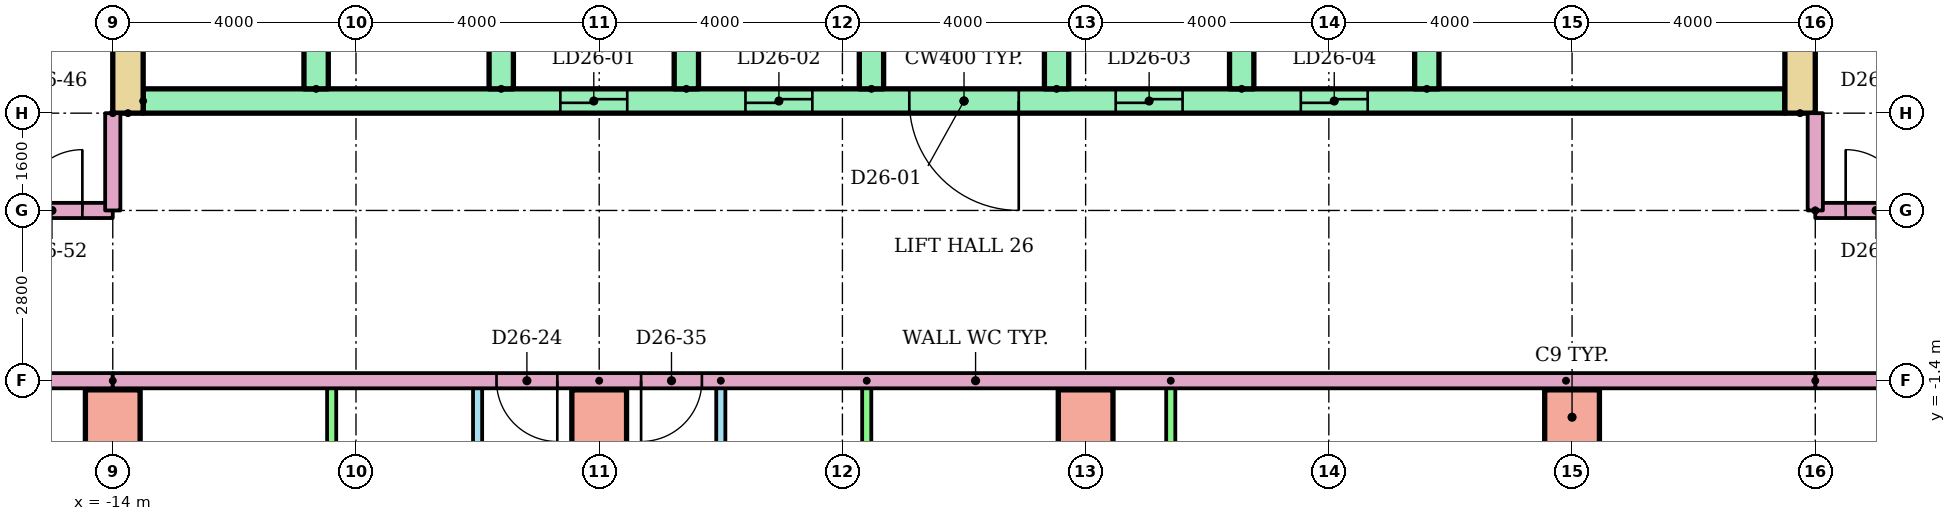
"""IFC4 building model, lengths in metres.
Left out: names, types, materials, properties, quantities, classifications, styles, units other than length and angle.
Written with IfcOpenShell. Run it as: python <this file> out.ifc"""

import sys

from ifc_helpers import new_model, si_unit, direction, frame, frame_2d, origin, origin_2d, place, context, subcontext, project, spatial, rectangle, extrude, element, fill, save


model = new_model("IFC4")
c1 = context("Model", 3, precision=1e-05, world=origin(), true_north=direction((0.0, 1.0)))
c2 = subcontext(c1, "Body", "Model", "MODEL_VIEW")
j1 = project(units=[si_unit("LENGTHUNIT", "METRE"), si_unit("PLANEANGLEUNIT", "RADIAN")], contexts=[c1])
p1 = place(None, origin())
s1 = spatial("IfcSite", under=j1, at=p1, CompositionType="ELEMENT")
p2 = place(p1, origin())
s2 = spatial("IfcBuilding", under=s1, at=p2, CompositionType="ELEMENT")
p3 = place(p2, frame((0.0, 0.0, 99.9)))
s3 = spatial("IfcBuildingStorey", under=s2, at=p3, CompositionType="ELEMENT", Elevation=99.9)
for number, where in (
    (1, (-14.0, -2.0, 0.0)),
    (2, (-6.0, -2.0, 0.0)),
    (3, (2.0, -2.0, 0.0)),
    (4, (10.0, -2.0, 0.0)),
):
    element("IfcColumn", number, at=place(p3, frame(where)), inside=s3, PredefinedType="COLUMN", context=c2, shape_type="SweptSolid", body=[
        extrude(rectangle(XDim=0.9, YDim=0.9, at=origin_2d()), origin(), (0.0, 0.0, 1.0), 3.2),
    ])
for number, where, z_axis, x_axis in (
    (5, (-13.75, 3.0, 0.0), (0.0, 0.0, 1.0), (0.0, 1.0, 0.0)),
    (6, (13.75, 3.0, 0.0), (0.0, 0.0, 1.0), (0.0, 1.0, 0.0)),
):
    element("IfcWall", number, at=place(p3, frame(where, z_axis=z_axis, x_axis=x_axis)), inside=s3, PredefinedType="SHEAR", context=c2, shape_type="SweptSolid", body=[
        extrude(rectangle(XDim=17.0, YDim=0.5, at=frame_2d((8.5, 0.0))), origin(), (0.0, 0.0, 1.0), 2.92),
    ])
p4 = place(p3, frame((-13.5, 3.2, 0.0)))
e7 = element("IfcWall", 7, at=p4, inside=s3, PredefinedType="SHEAR", context=c2, shape_type="SweptSolid", body=[
    extrude(rectangle(XDim=27.0, YDim=0.4, at=frame_2d((13.5, 0.0))), origin(), (0.0, 0.0, 1.0), 2.92),
])
p5 = place(p4, frame((6.861, 0.0, 0.0)))
e8 = element("IfcOpeningElement", 8, at=p5, cuts=e7, PredefinedType="OPENING", context=c2, shape_type="SweptSolid", body=[
    extrude(rectangle(XDim=1.1, YDim=2.1, at=frame_2d((0.55, 1.05))), frame((0.0, 0.21, 0.0), z_axis=(0.0, -1.0, 0.0), x_axis=(1.0, 0.0, 0.0)), (0.0, 0.0, 1.0), 0.42),
])
p6 = place(p4, frame((9.906, 0.0, 0.0)))
e9 = element("IfcOpeningElement", 9, at=p6, cuts=e7, PredefinedType="OPENING", context=c2, shape_type="SweptSolid", body=[
    extrude(rectangle(XDim=1.1, YDim=2.1, at=frame_2d((0.55, 1.05))), frame((0.0, 0.21, 0.0), z_axis=(0.0, -1.0, 0.0), x_axis=(1.0, 0.0, 0.0)), (0.0, 0.0, 1.0), 0.42),
])
p7 = place(p4, frame((15.994, 0.0, 0.0)))
e10 = element("IfcOpeningElement", 10, at=p7, cuts=e7, PredefinedType="OPENING", context=c2, shape_type="SweptSolid", body=[
    extrude(rectangle(XDim=1.1, YDim=2.1, at=frame_2d((0.55, 1.05))), frame((0.0, 0.21, 0.0), z_axis=(0.0, -1.0, 0.0), x_axis=(1.0, 0.0, 0.0)), (0.0, 0.0, 1.0), 0.42),
])
p8 = place(p4, frame((19.039, 0.0, 0.0)))
e11 = element("IfcOpeningElement", 11, at=p8, cuts=e7, PredefinedType="OPENING", context=c2, shape_type="SweptSolid", body=[
    extrude(rectangle(XDim=1.1, YDim=2.1, at=frame_2d((0.55, 1.05))), frame((0.0, 0.21, 0.0), z_axis=(0.0, -1.0, 0.0), x_axis=(1.0, 0.0, 0.0)), (0.0, 0.0, 1.0), 0.42),
])
p9 = place(p4, frame((12.6, 0.0, 0.0)))
e12 = element("IfcOpeningElement", 12, at=p9, cuts=e7, PredefinedType="OPENING", context=c2, shape_type="SweptSolid", body=[
    extrude(rectangle(XDim=1.8, YDim=2.1, at=frame_2d((0.9, 1.05))), frame((0.0, 0.21, 0.0), z_axis=(0.0, -1.0, 0.0), x_axis=(1.0, 0.0, 0.0)), (0.0, 0.0, 1.0), 0.42),
])
for number, where, z_axis, x_axis in (
    (13, (-10.656, 3.4, 0.0), (0.0, 0.0, 1.0), (0.0, 1.0, 0.0)),
    (14, (-7.611, 3.4, 0.0), (0.0, 0.0, 1.0), (0.0, 1.0, 0.0)),
    (15, (-4.567, 3.4, 0.0), (0.0, 0.0, 1.0), (0.0, 1.0, 0.0)),
    (16, (-1.522, 3.4, 0.0), (0.0, 0.0, 1.0), (0.0, 1.0, 0.0)),
    (17, (1.522, 3.4, 0.0), (0.0, 0.0, 1.0), (0.0, 1.0, 0.0)),
    (18, (4.567, 3.4, 0.0), (0.0, 0.0, 1.0), (0.0, 1.0, 0.0)),
    (19, (7.611, 3.4, 0.0), (0.0, 0.0, 1.0), (0.0, 1.0, 0.0)),
):
    element("IfcWall", number, at=place(p3, frame(where, z_axis=z_axis, x_axis=x_axis)), inside=s3, PredefinedType="SHEAR", context=c2, shape_type="SweptSolid", body=[
        extrude(rectangle(XDim=3.0, YDim=0.4, at=frame_2d((1.5, 0.0))), origin(), (0.0, 0.0, 1.0), 2.92),
    ])
p10 = place(p3, frame((-8.0, -6.7, 0.0), z_axis=(0.0, 0.0, 1.0), x_axis=(0.0, 1.0, 0.0)))
e20 = element("IfcWall", 20, at=p10, inside=s3, PredefinedType="PARTITIONING", context=c2, shape_type="SweptSolid", body=[
    extrude(rectangle(XDim=5.3, YDim=0.15, at=frame_2d((2.65, 0.0))), origin(), (0.0, 0.0, 1.0), 2.4),
])
p11 = place(p10, frame((3.35, 0.0, 0.0)))
e21 = element("IfcOpeningElement", 21, at=p11, cuts=e20, PredefinedType="OPENING", context=c2, shape_type="SweptSolid", body=[
    extrude(rectangle(XDim=0.9, YDim=2.1, at=frame_2d((0.45, 1.05))), frame((0.0, 0.085, 0.0), z_axis=(0.0, -1.0, 0.0), x_axis=(1.0, 0.0, 0.0)), (0.0, 0.0, 1.0), 0.17),
])
p12 = place(p10, frame((0.75, 0.0, 0.0)))
e22 = element("IfcOpeningElement", 22, at=p12, cuts=e20, PredefinedType="OPENING", context=c2, shape_type="SweptSolid", body=[
    extrude(rectangle(XDim=0.8, YDim=2.1, at=frame_2d((0.4, 1.05))), frame((0.0, 0.085, 0.0), z_axis=(0.0, -1.0, 0.0), x_axis=(1.0, 0.0, 0.0)), (0.0, 0.0, 1.0), 0.17),
])
p13 = place(p3, frame((-10.4, -6.7, 0.0), z_axis=(0.0, 0.0, 1.0), x_axis=(0.0, 1.0, 0.0)))
e23 = element("IfcWall", 23, at=p13, inside=s3, PredefinedType="PARTITIONING", context=c2, shape_type="SweptSolid", body=[
    extrude(rectangle(XDim=5.3, YDim=0.15, at=frame_2d((2.65, 0.0))), origin(), (0.0, 0.0, 1.0), 2.4),
])
p14 = place(p3, frame((-4.0, -1.4, 0.0), z_axis=(0.0, 0.0, 1.0), x_axis=(0.0, -1.0, 0.0)))
e24 = element("IfcWall", 24, at=p14, inside=s3, PredefinedType="PARTITIONING", context=c2, shape_type="SweptSolid", body=[
    extrude(rectangle(XDim=5.3, YDim=0.15, at=frame_2d((2.65, 0.0))), origin(), (0.0, 0.0, 1.0), 2.4),
])
p15 = place(p14, frame((1.05, 0.0, 0.0)))
e25 = element("IfcOpeningElement", 25, at=p15, cuts=e24, PredefinedType="OPENING", context=c2, shape_type="SweptSolid", body=[
    extrude(rectangle(XDim=0.9, YDim=2.1, at=frame_2d((0.45, 1.05))), frame((0.0, 0.085, 0.0), z_axis=(0.0, -1.0, 0.0), x_axis=(1.0, 0.0, 0.0)), (0.0, 0.0, 1.0), 0.17),
])
p16 = place(p14, frame((3.75, 0.0, 0.0)))
e26 = element("IfcOpeningElement", 26, at=p16, cuts=e24, PredefinedType="OPENING", context=c2, shape_type="SweptSolid", body=[
    extrude(rectangle(XDim=0.8, YDim=2.1, at=frame_2d((0.4, 1.05))), frame((0.0, 0.085, 0.0), z_axis=(0.0, -1.0, 0.0), x_axis=(1.0, 0.0, 0.0)), (0.0, 0.0, 1.0), 0.17),
])
for number, where, z_axis, x_axis in (
    (27, (-1.6, -1.4, 0.0), (0.0, 0.0, 1.0), (0.0, -1.0, 0.0)),
    (28, (3.4, -1.4, 0.0), (0.0, 0.0, 1.0), (0.0, -1.0, 0.0)),
    (29, (9.9, -1.4, 0.0), (0.0, 0.0, 1.0), (0.0, -1.0, 0.0)),
):
    element("IfcWall", number, at=place(p3, frame(where, z_axis=z_axis, x_axis=x_axis)), inside=s3, PredefinedType="PARTITIONING", context=c2, shape_type="SweptSolid", body=[
        extrude(rectangle(XDim=5.3, YDim=0.15, at=frame_2d((2.65, 0.0))), origin(), (0.0, 0.0, 1.0), 2.4),
    ])
p17 = place(p3, frame((-6.0, -1.4, 0.0), z_axis=(0.0, 0.0, 1.0), x_axis=(0.0, -1.0, 0.0)))
e30 = element("IfcWall", 30, at=p17, inside=s3, PredefinedType="PARTITIONING", context=c2, shape_type="SweptSolid", body=[
    extrude(rectangle(XDim=14.81, YDim=0.25, at=frame_2d((7.405, 0.0))), origin(), (0.0, 0.0, 1.0), 2.4),
])
p18 = place(p3, frame((-14.0, -1.4, 0.0), z_axis=(0.0, 0.0, 1.0), x_axis=(-1.0, 0.0, 0.0)))
e31 = element("IfcWall", 31, at=p18, inside=s3, PredefinedType="PARTITIONING", context=c2, shape_type="SweptSolid", body=[
    extrude(rectangle(XDim=14.62, YDim=0.25, at=frame_2d((7.31, 0.0))), origin(), (0.0, 0.0, 1.0), 2.4),
])
p19 = place(p3, frame((29.0, -1.4, 0.0), z_axis=(0.0, 0.0, 1.0), x_axis=(-1.0, 0.0, 0.0)))
e32 = element("IfcWall", 32, at=p19, inside=s3, PredefinedType="PARTITIONING", context=c2, shape_type="SweptSolid", body=[
    extrude(rectangle(XDim=15.0, YDim=0.25, at=frame_2d((7.5, 0.0))), origin(), (0.0, 0.0, 1.0), 2.4),
])
p20 = place(p19, frame((9.311, 0.0, 0.0)))
e33 = element("IfcOpeningElement", 33, at=p20, cuts=e32, PredefinedType="OPENING", context=c2, shape_type="SweptSolid", body=[
    extrude(rectangle(XDim=1.0, YDim=2.1, at=frame_2d((0.5, 1.05))), frame((0.0, 0.135, 0.0), z_axis=(0.0, -1.0, 0.0), x_axis=(1.0, 0.0, 0.0)), (0.0, 0.0, 1.0), 0.27),
])
p21 = place(p3, frame((-28.62, 1.4, 0.0)))
e34 = element("IfcWall", 34, at=p21, inside=s3, PredefinedType="PARTITIONING", context=c2, shape_type="SweptSolid", body=[
    extrude(rectangle(XDim=14.62, YDim=0.25, at=frame_2d((7.31, 0.0))), origin(), (0.0, 0.0, 1.0), 2.4),
])
p22 = place(p21, frame((13.12, 0.0, 0.0)))
e35 = element("IfcOpeningElement", 35, at=p22, cuts=e34, PredefinedType="OPENING", context=c2, shape_type="SweptSolid", body=[
    extrude(rectangle(XDim=1.0, YDim=2.1, at=frame_2d((0.5, 1.05))), frame((0.0, 0.135, 0.0), z_axis=(0.0, -1.0, 0.0), x_axis=(1.0, 0.0, 0.0)), (0.0, 0.0, 1.0), 0.27),
])
p23 = place(p3, frame((14.0, 1.4, 0.0)))
e36 = element("IfcWall", 36, at=p23, inside=s3, PredefinedType="PARTITIONING", context=c2, shape_type="SweptSolid", body=[
    extrude(rectangle(XDim=15.0, YDim=0.25, at=frame_2d((7.5, 0.0))), origin(), (0.0, 0.0, 1.0), 2.4),
])
p24 = place(p23, frame((0.5, 0.0, 0.0)))
e37 = element("IfcOpeningElement", 37, at=p24, cuts=e36, PredefinedType="OPENING", context=c2, shape_type="SweptSolid", body=[
    extrude(rectangle(XDim=1.0, YDim=2.1, at=frame_2d((0.5, 1.05))), frame((0.0, 0.135, 0.0), z_axis=(0.0, -1.0, 0.0), x_axis=(1.0, 0.0, 0.0)), (0.0, 0.0, 1.0), 0.27),
])
p25 = place(p23, frame((12.689, 0.0, 0.0)))
e38 = element("IfcOpeningElement", 38, at=p25, cuts=e36, PredefinedType="OPENING", context=c2, shape_type="SweptSolid", body=[
    extrude(rectangle(XDim=1.0, YDim=2.1, at=frame_2d((0.5, 1.05))), frame((0.0, 0.135, 0.0), z_axis=(0.0, -1.0, 0.0), x_axis=(1.0, 0.0, 0.0)), (0.0, 0.0, 1.0), 0.27),
])
p26 = place(p3, frame((14.0, -1.4, 0.0), z_axis=(0.0, 0.0, 1.0), x_axis=(-1.0, 0.0, 0.0)))
e39 = element("IfcWall", 39, at=p26, inside=s3, PredefinedType="PARTITIONING", context=c2, shape_type="SweptSolid", body=[
    extrude(rectangle(XDim=28.0, YDim=0.25, at=frame_2d((14.0, 0.0))), origin(), (0.0, 0.0, 1.0), 2.4),
])
p27 = place(p26, frame((20.689, 0.0, 0.0)))
e40 = element("IfcOpeningElement", 40, at=p27, cuts=e39, PredefinedType="OPENING", context=c2, shape_type="SweptSolid", body=[
    extrude(rectangle(XDim=1.0, YDim=2.1, at=frame_2d((0.5, 1.05))), frame((0.0, 0.135, 0.0), z_axis=(0.0, -1.0, 0.0), x_axis=(1.0, 0.0, 0.0)), (0.0, 0.0, 1.0), 0.27),
])
p28 = place(p26, frame((18.311, 0.0, 0.0)))
e41 = element("IfcOpeningElement", 41, at=p28, cuts=e39, PredefinedType="OPENING", context=c2, shape_type="SweptSolid", body=[
    extrude(rectangle(XDim=1.0, YDim=2.1, at=frame_2d((0.5, 1.05))), frame((0.0, 0.135, 0.0), z_axis=(0.0, -1.0, 0.0), x_axis=(1.0, 0.0, 0.0)), (0.0, 0.0, 1.0), 0.27),
])
for number, where, z_axis, x_axis in (
    (42, (-14.0, 3.0, 0.0), (0.0, 0.0, 1.0), (0.0, -1.0, 0.0)),
    (43, (14.0, 1.4, 0.0), (0.0, 0.0, 1.0), (0.0, 1.0, 0.0)),
):
    element("IfcWall", number, at=place(p3, frame(where, z_axis=z_axis, x_axis=x_axis)), inside=s3, PredefinedType="PARTITIONING", context=c2, shape_type="SweptSolid", body=[
        extrude(rectangle(XDim=1.6, YDim=0.25, at=frame_2d((0.8, 0.0))), origin(), (0.0, 0.0, 1.0), 2.4),
    ])
p29 = place(p5, origin())
e44 = element("IfcDoor", 44, at=p29, inside=s3, OperationType="SLIDING_TO_LEFT", PredefinedType="DOOR", context=c2, shape_type="SweptSolid", body=[
    extrude(rectangle(XDim=1.1, YDim=2.1, at=frame_2d((0.55, 1.05))), frame((0.0, 0.025, 0.0), z_axis=(0.0, -1.0, 0.0), x_axis=(1.0, 0.0, 0.0)), (0.0, 0.0, 1.0), 0.05),
])
fill(e8, e44)
p30 = place(p6, origin())
e45 = element("IfcDoor", 45, at=p30, inside=s3, OperationType="SLIDING_TO_LEFT", PredefinedType="DOOR", context=c2, shape_type="SweptSolid", body=[
    extrude(rectangle(XDim=1.1, YDim=2.1, at=frame_2d((0.55, 1.05))), frame((0.0, 0.025, 0.0), z_axis=(0.0, -1.0, 0.0), x_axis=(1.0, 0.0, 0.0)), (0.0, 0.0, 1.0), 0.05),
])
fill(e9, e45)
p31 = place(p7, origin())
e46 = element("IfcDoor", 46, at=p31, inside=s3, OperationType="SLIDING_TO_LEFT", PredefinedType="DOOR", context=c2, shape_type="SweptSolid", body=[
    extrude(rectangle(XDim=1.1, YDim=2.1, at=frame_2d((0.55, 1.05))), frame((0.0, 0.025, 0.0), z_axis=(0.0, -1.0, 0.0), x_axis=(1.0, 0.0, 0.0)), (0.0, 0.0, 1.0), 0.05),
])
fill(e10, e46)
p32 = place(p8, origin())
e47 = element("IfcDoor", 47, at=p32, inside=s3, OperationType="SLIDING_TO_LEFT", PredefinedType="DOOR", context=c2, shape_type="SweptSolid", body=[
    extrude(rectangle(XDim=1.1, YDim=2.1, at=frame_2d((0.55, 1.05))), frame((0.0, 0.025, 0.0), z_axis=(0.0, -1.0, 0.0), x_axis=(1.0, 0.0, 0.0)), (0.0, 0.0, 1.0), 0.05),
])
fill(e11, e47)
p33 = place(p9, frame((1.8, 0.0, 0.0), z_axis=(0.0, 0.0, 1.0), x_axis=(-1.0, 0.0, 0.0)))
e48 = element("IfcDoor", 48, at=p33, inside=s3, OperationType="DOUBLE_DOOR_SINGLE_SWING", PredefinedType="DOOR", context=c2, shape_type="SweptSolid", body=[
    extrude(rectangle(XDim=1.8, YDim=2.1, at=frame_2d((0.9, 1.05))), frame((0.0, 0.025, 0.0), z_axis=(0.0, -1.0, 0.0), x_axis=(1.0, 0.0, 0.0)), (0.0, 0.0, 1.0), 0.05),
])
fill(e12, e48)
p34 = place(p27, origin())
e49 = element("IfcDoor", 49, at=p34, inside=s3, OperationType="SINGLE_SWING_LEFT", PredefinedType="DOOR", context=c2, shape_type="SweptSolid", body=[
    extrude(rectangle(XDim=1.0, YDim=2.1, at=frame_2d((0.5, 1.05))), frame((0.0, 0.025, 0.0), z_axis=(0.0, -1.0, 0.0), x_axis=(1.0, 0.0, 0.0)), (0.0, 0.0, 1.0), 0.05),
])
fill(e40, e49)
p35 = place(p28, origin())
e50 = element("IfcDoor", 50, at=p35, inside=s3, OperationType="SINGLE_SWING_RIGHT", PredefinedType="DOOR", context=c2, shape_type="SweptSolid", body=[
    extrude(rectangle(XDim=1.0, YDim=2.1, at=frame_2d((0.5, 1.05))), frame((0.0, 0.025, 0.0), z_axis=(0.0, -1.0, 0.0), x_axis=(1.0, 0.0, 0.0)), (0.0, 0.0, 1.0), 0.05),
])
fill(e41, e50)
p36 = place(p22, origin())
e51 = element("IfcDoor", 51, at=p36, inside=s3, OperationType="SINGLE_SWING_RIGHT", PredefinedType="DOOR", context=c2, shape_type="SweptSolid", body=[
    extrude(rectangle(XDim=1.0, YDim=2.1, at=frame_2d((0.5, 1.05))), frame((0.0, 0.025, 0.0), z_axis=(0.0, -1.0, 0.0), x_axis=(1.0, 0.0, 0.0)), (0.0, 0.0, 1.0), 0.05),
])
fill(e35, e51)
p37 = place(p24, origin())
e52 = element("IfcDoor", 52, at=p37, inside=s3, OperationType="SINGLE_SWING_LEFT", PredefinedType="DOOR", context=c2, shape_type="SweptSolid", body=[
    extrude(rectangle(XDim=1.0, YDim=2.1, at=frame_2d((0.5, 1.05))), frame((0.0, 0.025, 0.0), z_axis=(0.0, -1.0, 0.0), x_axis=(1.0, 0.0, 0.0)), (0.0, 0.0, 1.0), 0.05),
])
fill(e37, e52)
save(model, sys.argv[1])
